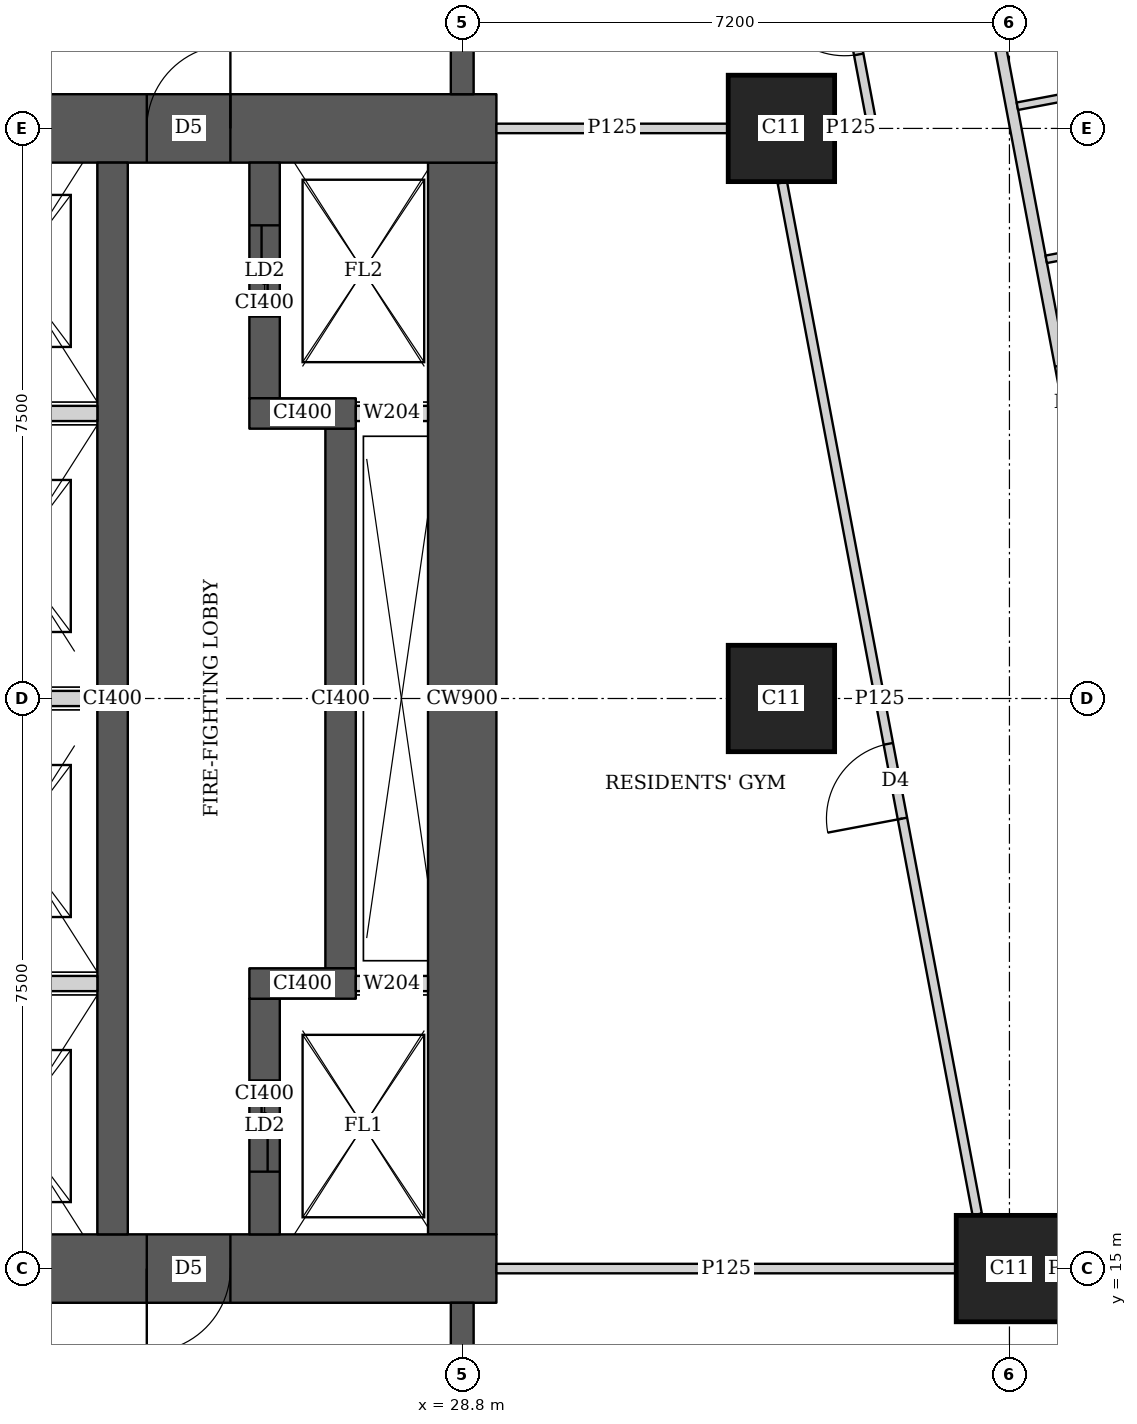
"""IFC4 building model, lengths in metres.
Left out: names, types, materials, properties, quantities, classifications, styles, units other than length and angle.
Written with IfcOpenShell. Run it as: python <this file> out.ifc"""

import sys

from ifc_helpers import new_model, si_unit, direction, frame, frame_2d, origin, origin_2d, place, context, subcontext, project, spatial, rectangle, extrude, element, fill, save


model = new_model("IFC4")
c1 = context("Model", 3, precision=1e-05, world=origin(), true_north=direction((0.0, 1.0)))
c2 = subcontext(c1, "Body", "Model", "MODEL_VIEW")
j1 = project(units=[si_unit("LENGTHUNIT", "METRE"), si_unit("PLANEANGLEUNIT", "RADIAN")], contexts=[c1])
p1 = place(None, origin())
s1 = spatial("IfcSite", under=j1, at=p1, CompositionType="ELEMENT")
p2 = place(p1, origin())
s2 = spatial("IfcBuilding", under=s1, at=p2, CompositionType="ELEMENT")
p3 = place(p2, frame((0.0, 0.0, 227.45)))
s3 = spatial("IfcBuildingStorey", under=s2, at=p3, CompositionType="ELEMENT", Elevation=227.45)
for number, where, z_axis, x_axis in (
    (1, (36.0, 15.0, 0.0), (0.0, 0.0, 1.0), (1.0, 0.0, 0.0)),
    (2, (33.0, 22.5, 0.0), (0.0, 0.0, 1.0), (1.0, 0.0, 0.0)),
    (3, (33.0, 30.0, 0.0), (0.0, 0.0, 1.0), (1.0, 0.0, 0.0)),
):
    element("IfcColumn", number, at=place(p3, frame(where, z_axis=z_axis, x_axis=x_axis)), inside=s3, PredefinedType="COLUMN", context=c2, shape_type="SweptSolid", body=[
        extrude(rectangle(XDim=1.4, YDim=1.4, at=origin_2d()), origin(), (0.0, 0.0, 1.0), 3.75),
    ])
p4 = place(p3, frame((13.95, 15.0, 0.0), z_axis=(0.0, 0.0, 1.0), x_axis=(1.0, 0.0, 0.0)))
e4 = element("IfcWall", 4, at=p4, inside=s3, PredefinedType="SHEAR", context=c2, shape_type="SweptSolid", body=[
    extrude(rectangle(XDim=15.3, YDim=0.9, at=frame_2d((7.65, 0.0))), origin(), (0.0, 0.0, 1.0), 3.75),
])
p5 = place(p4, frame((4.45, 0.0, 0.0)))
e5 = element("IfcOpeningElement", 5, at=p5, cuts=e4, PredefinedType="OPENING", context=c2, shape_type="SweptSolid", body=[
    extrude(rectangle(XDim=1.8, YDim=2.1, at=frame_2d((0.9, 1.05))), frame((0.0, 0.46, 0.0), z_axis=(0.0, -1.0, 0.0), x_axis=(1.0, 0.0, 0.0)), (0.0, 0.0, 1.0), 0.92),
])
p6 = place(p4, frame((10.7, 0.0, 0.0)))
e6 = element("IfcOpeningElement", 6, at=p6, cuts=e4, PredefinedType="OPENING", context=c2, shape_type="SweptSolid", body=[
    extrude(rectangle(XDim=1.1, YDim=2.1, at=frame_2d((0.55, 1.05))), frame((0.0, 0.46, 0.0), z_axis=(0.0, -1.0, 0.0), x_axis=(1.0, 0.0, 0.0)), (0.0, 0.0, 1.0), 0.92),
])
p7 = place(p3, frame((13.95, 30.0, 0.0), z_axis=(0.0, 0.0, 1.0), x_axis=(1.0, 0.0, 0.0)))
e7 = element("IfcWall", 7, at=p7, inside=s3, PredefinedType="SHEAR", context=c2, shape_type="SweptSolid", body=[
    extrude(rectangle(XDim=15.3, YDim=0.9, at=frame_2d((7.65, 0.0))), origin(), (0.0, 0.0, 1.0), 3.75),
])
p8 = place(p7, frame((4.45, 0.0, 0.0)))
e8 = element("IfcOpeningElement", 8, at=p8, cuts=e7, PredefinedType="OPENING", context=c2, shape_type="SweptSolid", body=[
    extrude(rectangle(XDim=1.8, YDim=2.1, at=frame_2d((0.9, 1.05))), frame((0.0, 0.46, 0.0), z_axis=(0.0, -1.0, 0.0), x_axis=(1.0, 0.0, 0.0)), (0.0, 0.0, 1.0), 0.92),
])
p9 = place(p7, frame((10.7, 0.0, 0.0)))
e9 = element("IfcOpeningElement", 9, at=p9, cuts=e7, PredefinedType="OPENING", context=c2, shape_type="SweptSolid", body=[
    extrude(rectangle(XDim=1.1, YDim=2.1, at=frame_2d((0.55, 1.05))), frame((0.0, 0.46, 0.0), z_axis=(0.0, -1.0, 0.0), x_axis=(1.0, 0.0, 0.0)), (0.0, 0.0, 1.0), 0.92),
])
p10 = place(p3, frame((28.8, 15.45, 0.0), z_axis=(0.0, 0.0, 1.0), x_axis=(0.0, 1.0, 0.0)))
e10 = element("IfcWall", 10, at=p10, inside=s3, PredefinedType="SHEAR", context=c2, shape_type="SweptSolid", body=[
    extrude(rectangle(XDim=14.1, YDim=0.9, at=frame_2d((7.05, 0.0))), origin(), (0.0, 0.0, 1.0), 3.75),
])
p11 = place(p3, frame((24.2, 15.45, 0.0), z_axis=(0.0, 0.0, 1.0), x_axis=(0.0, 1.0, 0.0)))
e11 = element("IfcWall", 11, at=p11, inside=s3, PredefinedType="SHEAR", context=c2, shape_type="SweptSolid", body=[
    extrude(rectangle(XDim=14.1, YDim=0.4, at=frame_2d((7.05, 0.0))), origin(), (0.0, 0.0, 1.0), 3.75),
])
p12 = place(p3, frame((26.2, 15.45, 0.0), z_axis=(0.0, 0.0, 1.0), x_axis=(0.0, 1.0, 0.0)))
e12 = element("IfcWall", 12, at=p12, inside=s3, PredefinedType="SHEAR", context=c2, shape_type="SweptSolid", body=[
    extrude(rectangle(XDim=3.1, YDim=0.4, at=frame_2d((1.55, 0.0))), origin(), (0.0, 0.0, 1.0), 3.75),
])
p13 = place(p12, frame((0.825, 0.0, 0.0)))
e13 = element("IfcOpeningElement", 13, at=p13, cuts=e12, PredefinedType="OPENING", context=c2, shape_type="SweptSolid", body=[
    extrude(rectangle(XDim=1.2, YDim=2.1, at=frame_2d((0.6, 1.05))), frame((0.0, 0.21, 0.0), z_axis=(0.0, -1.0, 0.0), x_axis=(1.0, 0.0, 0.0)), (0.0, 0.0, 1.0), 0.42),
])
p14 = place(p3, frame((26.0, 18.75, 0.0), z_axis=(0.0, 0.0, 1.0), x_axis=(1.0, 0.0, 0.0)))
e14 = element("IfcWall", 14, at=p14, inside=s3, PredefinedType="SHEAR", context=c2, shape_type="SweptSolid", body=[
    extrude(rectangle(XDim=1.4, YDim=0.4, at=frame_2d((0.7, 0.0))), origin(), (0.0, 0.0, 1.0), 3.75),
])
p15 = place(p3, frame((27.2, 18.95, 0.0), z_axis=(0.0, 0.0, 1.0), x_axis=(0.0, 1.0, 0.0)))
e15 = element("IfcWall", 15, at=p15, inside=s3, PredefinedType="SHEAR", context=c2, shape_type="SweptSolid", body=[
    extrude(rectangle(XDim=7.1, YDim=0.4, at=frame_2d((3.55, 0.0))), origin(), (0.0, 0.0, 1.0), 3.75),
])
p16 = place(p3, frame((26.0, 26.25, 0.0), z_axis=(0.0, 0.0, 1.0), x_axis=(1.0, 0.0, 0.0)))
e16 = element("IfcWall", 16, at=p16, inside=s3, PredefinedType="SHEAR", context=c2, shape_type="SweptSolid", body=[
    extrude(rectangle(XDim=1.4, YDim=0.4, at=frame_2d((0.7, 0.0))), origin(), (0.0, 0.0, 1.0), 3.75),
])
p17 = place(p3, frame((26.2, 26.45, 0.0), z_axis=(0.0, 0.0, 1.0), x_axis=(0.0, 1.0, 0.0)))
e17 = element("IfcWall", 17, at=p17, inside=s3, PredefinedType="SHEAR", context=c2, shape_type="SweptSolid", body=[
    extrude(rectangle(XDim=3.1, YDim=0.4, at=frame_2d((1.55, 0.0))), origin(), (0.0, 0.0, 1.0), 3.75),
])
p18 = place(p17, frame((1.075, 0.0, 0.0)))
e18 = element("IfcOpeningElement", 18, at=p18, cuts=e17, PredefinedType="OPENING", context=c2, shape_type="SweptSolid", body=[
    extrude(rectangle(XDim=1.2, YDim=2.1, at=frame_2d((0.6, 1.05))), frame((0.0, 0.21, 0.0), z_axis=(0.0, -1.0, 0.0), x_axis=(1.0, 0.0, 0.0)), (0.0, 0.0, 1.0), 0.42),
])
for number, where, z_axis, x_axis in (
    (19, (28.8, 10.35, 0.0), (0.0, 0.0, 1.0), (0.0, 1.0, 0.0)),
    (20, (28.8, 30.45, 0.0), (0.0, 0.0, 1.0), (0.0, 1.0, 0.0)),
):
    element("IfcWall", number, at=place(p3, frame(where, z_axis=z_axis, x_axis=x_axis)), inside=s3, PredefinedType="SHEAR", context=c2, shape_type="SweptSolid", body=[
        extrude(rectangle(XDim=4.2, YDim=0.3, at=frame_2d((2.1, 0.0))), origin(), (0.0, 0.0, 1.0), 3.75),
    ])
p19 = place(p3, frame((33.68, 42.723, 0.0), z_axis=(0.0, 0.0, 1.0), x_axis=(0.185601160014, -0.982625162207, 0.0)))
e21 = element("IfcWall", 21, at=p19, inside=s3, PredefinedType="SOLIDWALL", context=c2, shape_type="SweptSolid", body=[
    extrude(rectangle(XDim=41.051, YDim=0.15, at=frame_2d((20.526, 0.0))), origin(), (0.0, 0.0, 1.0), 2.5),
])
p20 = place(p19, frame((16.123, 0.0, 0.0)))
e22 = element("IfcOpeningElement", 22, at=p20, cuts=e21, PredefinedType="OPENING", context=c2, shape_type="SweptSolid", body=[
    extrude(rectangle(XDim=1.0, YDim=2.1, at=frame_2d((0.5, 1.05))), frame((0.0, 0.085, 0.0), z_axis=(0.0, -1.0, 0.0), x_axis=(1.0, 0.0, 0.0)), (0.0, 0.0, 1.0), 0.17),
])
p21 = place(p19, frame((19.938, 0.0, 0.0)))
e23 = element("IfcOpeningElement", 23, at=p21, cuts=e21, PredefinedType="OPENING", context=c2, shape_type="SweptSolid", body=[
    extrude(rectangle(XDim=1.0, YDim=2.1, at=frame_2d((0.5, 1.05))), frame((0.0, 0.085, 0.0), z_axis=(0.0, -1.0, 0.0), x_axis=(1.0, 0.0, 0.0)), (0.0, 0.0, 1.0), 0.17),
])
p22 = place(p19, frame((30.902, 0.0, 0.0)))
e24 = element("IfcOpeningElement", 24, at=p22, cuts=e21, PredefinedType="OPENING", context=c2, shape_type="SweptSolid", body=[
    extrude(rectangle(XDim=1.0, YDim=2.1, at=frame_2d((0.5, 1.05))), frame((0.0, 0.085, 0.0), z_axis=(0.0, -1.0, 0.0), x_axis=(1.0, 0.0, 0.0)), (0.0, 0.0, 1.0), 0.17),
])
p23 = place(p3, frame((39.997, 28.942, 0.0), z_axis=(0.0, 0.0, 1.0), x_axis=(-0.982613029841, -0.185665380691, 0.0)))
e25 = element("IfcWall", 25, at=p23, inside=s3, PredefinedType="PARTITIONING", context=c2, shape_type="SweptSolid", body=[
    extrude(rectangle(XDim=3.575, YDim=0.1, at=frame_2d((1.788, 0.0))), origin(), (0.0, 0.0, 1.0), 3.5),
])
p24 = place(p3, frame((39.567, 30.947, 0.0), z_axis=(0.0, 0.0, 1.0), x_axis=(-0.982576058723, -0.185860939478, 0.0)))
e26 = element("IfcWall", 26, at=p24, inside=s3, PredefinedType="PARTITIONING", context=c2, shape_type="SweptSolid", body=[
    extrude(rectangle(XDim=3.524, YDim=0.1, at=frame_2d((1.762, 0.0))), origin(), (0.0, 0.0, 1.0), 2.5),
])
p25 = place(p3, frame((34.193, 30.04, 0.0), z_axis=(0.0, 0.0, 1.0), x_axis=(-0.185626015863, 0.982620467034, 0.0)))
e27 = element("IfcWall", 27, at=p25, inside=s3, PredefinedType="PARTITIONING", context=c2, shape_type="SweptSolid", body=[
    extrude(rectangle(XDim=4.628, YDim=0.125, at=frame_2d((2.314, 0.0))), origin(), (0.0, 0.0, 1.0), 2.5),
])
p26 = place(p25, frame((0.95, 0.0, 0.0)))
e28 = element("IfcOpeningElement", 28, at=p26, cuts=e27, PredefinedType="OPENING", context=c2, shape_type="SweptSolid", body=[
    extrude(rectangle(XDim=1.0, YDim=2.1, at=frame_2d((0.5, 1.05))), frame((0.0, 0.073, 0.0), z_axis=(0.0, -1.0, 0.0), x_axis=(1.0, 0.0, 0.0)), (0.0, 0.0, 1.0), 0.145),
])
p27 = place(p25, frame((3.225, 0.0, 0.0)))
e29 = element("IfcOpeningElement", 29, at=p27, cuts=e27, PredefinedType="OPENING", context=c2, shape_type="SweptSolid", body=[
    extrude(rectangle(XDim=1.0, YDim=2.1, at=frame_2d((0.5, 1.05))), frame((0.0, 0.073, 0.0), z_axis=(0.0, -1.0, 0.0), x_axis=(1.0, 0.0, 0.0)), (0.0, 0.0, 1.0), 0.145),
])
p28 = place(p3, frame((35.576, 15.713, 0.0), z_axis=(0.0, 0.0, 1.0), x_axis=(-0.185602982696, 0.982624817931, 0.0)))
e30 = element("IfcWall", 30, at=p28, inside=s3, PredefinedType="PARTITIONING", context=c2, shape_type="SweptSolid", body=[
    extrude(rectangle(XDim=13.814, YDim=0.125, at=frame_2d((6.907, 0.0))), origin(), (0.0, 0.0, 1.0), 2.5),
])
p29 = place(p28, frame((5.3, 0.0, 0.0)))
e31 = element("IfcOpeningElement", 31, at=p29, cuts=e30, PredefinedType="OPENING", context=c2, shape_type="SweptSolid", body=[
    extrude(rectangle(XDim=1.0, YDim=2.1, at=frame_2d((0.5, 1.05))), frame((0.0, 0.073, 0.0), z_axis=(0.0, -1.0, 0.0), x_axis=(1.0, 0.0, 0.0)), (0.0, 0.0, 1.0), 0.145),
])
p30 = place(p3, frame((29.25, 15.0, 0.0), z_axis=(0.0, 0.0, 1.0), x_axis=(1.0, 0.0, 0.0)))
e32 = element("IfcWall", 32, at=p30, inside=s3, PredefinedType="PARTITIONING", context=c2, shape_type="SweptSolid", body=[
    extrude(rectangle(XDim=6.049, YDim=0.125, at=frame_2d((3.024, 0.0))), origin(), (0.0, 0.0, 1.0), 3.5),
])
p31 = place(p3, frame((29.25, 30.0, 0.0), z_axis=(0.0, 0.0, 1.0), x_axis=(1.0, 0.0, 0.0)))
e33 = element("IfcWall", 33, at=p31, inside=s3, PredefinedType="PARTITIONING", context=c2, shape_type="SweptSolid", body=[
    extrude(rectangle(XDim=3.049, YDim=0.125, at=frame_2d((1.524, 0.0))), origin(), (0.0, 0.0, 1.0), 3.5),
])
p32 = place(p3, frame((33.701, 30.0, 0.0), z_axis=(0.0, 0.0, 1.0), x_axis=(1.0, 0.0, 0.0)))
e34 = element("IfcWall", 34, at=p32, inside=s3, PredefinedType="PARTITIONING", context=c2, shape_type="SweptSolid", body=[
    extrude(rectangle(XDim=0.424, YDim=0.125, at=frame_2d((0.212, 0.0))), origin(), (0.0, 0.0, 1.0), 2.5),
])
for number, where, z_axis, x_axis in (
    (35, (21.8, 18.75, 0.0), (0.0, 0.0, 1.0), (1.0, 0.0, 0.0)),
    (36, (21.8, 22.5, 0.0), (0.0, 0.0, 1.0), (1.0, 0.0, 0.0)),
    (37, (21.8, 26.25, 0.0), (0.0, 0.0, 1.0), (1.0, 0.0, 0.0)),
):
    element("IfcWall", number, at=place(p3, frame(where, z_axis=z_axis, x_axis=x_axis)), inside=s3, PredefinedType="SOLIDWALL", context=c2, shape_type="SweptSolid", body=[
        extrude(rectangle(XDim=2.2, YDim=0.2, at=frame_2d((1.1, 0.0))), origin(), (0.0, 0.0, 1.0), 3.5),
    ])
for number, where, z_axis, x_axis in (
    (38, (27.4, 18.75, 0.0), (0.0, 0.0, 1.0), (1.0, 0.0, 0.0)),
    (39, (27.4, 26.25, 0.0), (0.0, 0.0, 1.0), (1.0, 0.0, 0.0)),
):
    element("IfcWall", number, at=place(p3, frame(where, z_axis=z_axis, x_axis=x_axis)), inside=s3, PredefinedType="SOLIDWALL", context=c2, shape_type="SweptSolid", body=[
        extrude(rectangle(XDim=0.95, YDim=0.2, at=frame_2d((0.475, 0.0))), origin(), (0.0, 0.0, 1.0), 3.5),
    ])
p33 = place(p29, origin())
e40 = element("IfcDoor", 40, at=p33, inside=s3, OperationType="SINGLE_SWING_LEFT", PredefinedType="DOOR", context=c2, shape_type="SweptSolid", body=[
    extrude(rectangle(XDim=1.0, YDim=2.1, at=frame_2d((0.5, 1.05))), frame((0.0, 0.025, 0.0), z_axis=(0.0, -1.0, 0.0), x_axis=(1.0, 0.0, 0.0)), (0.0, 0.0, 1.0), 0.05),
])
fill(e31, e40)
p34 = place(p26, origin())
e41 = element("IfcDoor", 41, at=p34, inside=s3, OperationType="SINGLE_SWING_RIGHT", PredefinedType="DOOR", context=c2, shape_type="SweptSolid", body=[
    extrude(rectangle(XDim=1.0, YDim=2.1, at=frame_2d((0.5, 1.05))), frame((0.0, 0.025, 0.0), z_axis=(0.0, -1.0, 0.0), x_axis=(1.0, 0.0, 0.0)), (0.0, 0.0, 1.0), 0.05),
])
fill(e28, e41)
p35 = place(p6, origin())
e42 = element("IfcDoor", 42, at=p35, inside=s3, OperationType="SINGLE_SWING_RIGHT", PredefinedType="DOOR", context=c2, shape_type="SweptSolid", body=[
    extrude(rectangle(XDim=1.1, YDim=2.1, at=frame_2d((0.55, 1.05))), frame((0.0, 0.025, 0.0), z_axis=(0.0, -1.0, 0.0), x_axis=(1.0, 0.0, 0.0)), (0.0, 0.0, 1.0), 0.05),
])
fill(e6, e42)
p36 = place(p9, origin())
e43 = element("IfcDoor", 43, at=p36, inside=s3, OperationType="SINGLE_SWING_RIGHT", PredefinedType="DOOR", context=c2, shape_type="SweptSolid", body=[
    extrude(rectangle(XDim=1.1, YDim=2.1, at=frame_2d((0.55, 1.05))), frame((0.0, 0.025, 0.0), z_axis=(0.0, -1.0, 0.0), x_axis=(1.0, 0.0, 0.0)), (0.0, 0.0, 1.0), 0.05),
])
fill(e9, e43)
p37 = place(p13, origin())
e44 = element("IfcDoor", 44, at=p37, inside=s3, OperationType="DOUBLE_DOOR_SLIDING", PredefinedType="DOOR", context=c2, shape_type="SweptSolid", body=[
    extrude(rectangle(XDim=1.2, YDim=2.1, at=frame_2d((0.6, 1.05))), frame((0.0, 0.025, 0.0), z_axis=(0.0, -1.0, 0.0), x_axis=(1.0, 0.0, 0.0)), (0.0, 0.0, 1.0), 0.05),
])
fill(e13, e44)
p38 = place(p18, origin())
e45 = element("IfcDoor", 45, at=p38, inside=s3, OperationType="DOUBLE_DOOR_SLIDING", PredefinedType="DOOR", context=c2, shape_type="SweptSolid", body=[
    extrude(rectangle(XDim=1.2, YDim=2.1, at=frame_2d((0.6, 1.05))), frame((0.0, 0.025, 0.0), z_axis=(0.0, -1.0, 0.0), x_axis=(1.0, 0.0, 0.0)), (0.0, 0.0, 1.0), 0.05),
])
fill(e18, e45)
save(model, sys.argv[1])
